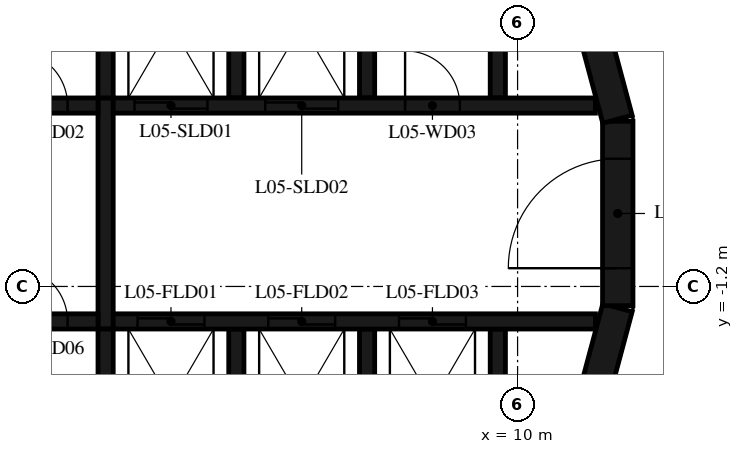
"""IFC4 building model, lengths in metres.
Left out: names, types, materials, properties, quantities, classifications, styles, units other than length and angle.
Written with IfcOpenShell. Run it as: python <this file> out.ifc"""

import sys

from ifc_helpers import new_model, si_unit, direction, frame, frame_2d, origin, place, context, subcontext, project, spatial, polyline, rectangle, outline, extrude, element, fill, save


model = new_model("IFC4")
c1 = context("Model", 3, precision=1e-05, world=origin(), true_north=direction((0.0, 1.0)))
c2 = subcontext(c1, "Body", "Model", "MODEL_VIEW")
j1 = project(units=[si_unit("LENGTHUNIT", "METRE"), si_unit("PLANEANGLEUNIT", "RADIAN")], contexts=[c1])
p1 = place(None, origin())
s1 = spatial("IfcSite", under=j1, at=p1, CompositionType="ELEMENT")
p2 = place(p1, origin())
s2 = spatial("IfcBuilding", under=s1, at=p2, CompositionType="ELEMENT")
p3 = place(p2, frame((0.0, 0.0, 28.2)))
s3 = spatial("IfcBuildingStorey", under=s2, at=p3, CompositionType="ELEMENT", Elevation=28.2)
p4 = place(p3, frame((10.858, -4.479, 0.0), z_axis=(0.0, 0.0, 1.0), x_axis=(0.258734743916, 0.965948410781, 0.0)))
e1 = element("IfcWall", 1, at=p4, inside=s3, PredefinedType="SHEAR", context=c2, shape_type="SweptSolid", body=[
    extrude(rectangle(XDim=3.033, YDim=0.5, at=frame_2d((1.516, 0.0))), origin(), (0.0, 0.0, 1.0), 4.35),
])
p5 = place(p3, frame((11.647, -1.516, 0.0), z_axis=(0.0, 0.0, 1.0), x_axis=(0.0, 1.0, 0.0)))
e2 = element("IfcWall", 2, at=p5, inside=s3, PredefinedType="SHEAR", context=c2, shape_type="SweptSolid", body=[
    extrude(rectangle(XDim=3.033, YDim=0.5, at=frame_2d((1.516, 0.0))), origin(), (0.0, 0.0, 1.0), 4.35),
])
p6 = place(p5, frame((0.616, 0.0, 0.0)))
e3 = element("IfcOpeningElement", 3, at=p6, cuts=e2, PredefinedType="OPENING", context=c2, shape_type="SweptSolid", body=[
    extrude(rectangle(XDim=1.8, YDim=2.1, at=frame_2d((0.9, 1.05))), frame((0.0, 0.26, 0.0), z_axis=(0.0, -1.0, 0.0), x_axis=(1.0, 0.0, 0.0)), (0.0, 0.0, 1.0), 0.52),
])
p7 = place(p3, frame((11.643, 1.55, 0.0), z_axis=(0.0, 0.0, 1.0), x_axis=(-0.258734743916, 0.965948410781, 0.0)))
e4 = element("IfcWall", 4, at=p7, inside=s3, PredefinedType="SHEAR", context=c2, shape_type="SweptSolid", body=[
    extrude(rectangle(XDim=3.033, YDim=0.5, at=frame_2d((1.516, 0.0))), origin(), (0.0, 0.0, 1.0), 4.35),
])
p8 = place(p3, origin())
e5 = element("IfcWall", 5, at=p8, inside=s3, PredefinedType="SHEAR", context=c2, shape_type="SweptSolid", body=[
    extrude(outline(polyline([(-9.55, 4.8), (-7.65, 4.8), (-7.65, 1.9), (-7.4, 1.9), (-7.4, 4.8), (-5.5, 4.8), (-5.5, 1.9), (-5.25, 1.9), (-5.25, 4.8), (-3.35, 4.8), (-3.35, 1.9), (-3.1, 1.9), (-3.1, 4.8), (-1.2, 4.8), (-1.2, 1.9), (-0.95, 1.9), (-0.95, 4.8), (0.95, 4.8), (0.95, 1.9), (1.2, 1.9), (1.2, 4.8), (3.1, 4.8), (3.1, 1.9), (3.35, 1.9), (3.35, 4.8), (5.25, 4.8), (5.25, 1.9), (5.5, 1.9), (5.5, 4.8), (7.4, 4.8), (7.4, 1.9), (7.65, 1.9), (7.65, 4.8), (9.55, 4.8), (9.55, 1.9), (9.8, 1.9), (9.8, 4.8), (9.8, 5.05), (-9.8, 5.05), (-9.8, 4.8), (-9.8, 1.9), (-9.55, 1.9), (-9.55, 4.8)])), origin(), (0.0, 0.0, 1.0), 4.35),
])
p9 = place(p3, origin())
e6 = element("IfcWall", 6, at=p9, inside=s3, PredefinedType="SHEAR", context=c2, shape_type="SweptSolid", body=[
    extrude(outline(polyline([(9.8, -5.05), (9.8, -4.8), (9.8, -1.9), (9.55, -1.9), (9.55, -4.8), (7.65, -4.8), (7.65, -1.9), (7.4, -1.9), (7.4, -4.8), (5.5, -4.8), (5.5, -1.9), (5.25, -1.9), (5.25, -4.8), (3.35, -4.8), (3.35, -1.9), (3.1, -1.9), (3.1, -4.8), (1.2, -4.8), (1.2, -1.9), (0.95, -1.9), (0.95, -4.8), (-0.95, -4.8), (-0.95, -1.9), (-1.2, -1.9), (-1.2, -4.8), (-5.25, -4.8), (-5.25, -1.9), (-5.5, -1.9), (-5.5, -4.8), (-7.4, -4.8), (-7.4, -1.9), (-7.65, -1.9), (-7.65, -4.8), (-9.55, -4.8), (-9.55, -1.9), (-9.8, -1.9), (-9.8, -4.8), (-9.8, -5.05), (9.8, -5.05)])), origin(), (0.0, 0.0, 1.0), 4.35),
])
p10 = place(p3, frame((-11.28, 1.775, 0.0), z_axis=(0.0, 0.0, 1.0), x_axis=(1.0, 0.0, 0.0)))
e7 = element("IfcWall", 7, at=p10, inside=s3, PredefinedType="SHEAR", context=c2, shape_type="SweptSolid", body=[
    extrude(rectangle(XDim=14.38, YDim=0.25, at=frame_2d((7.19, 0.0))), origin(), (0.0, 0.0, 1.0), 4.35),
])
p11 = place(p10, frame((2.13, 0.0, 0.0)))
e8 = element("IfcOpeningElement", 8, at=p11, cuts=e7, PredefinedType="OPENING", context=c2, shape_type="SweptSolid", body=[
    extrude(rectangle(XDim=1.1, YDim=2.1, at=frame_2d((0.55, 1.05))), frame((0.0, 0.135, 0.0), z_axis=(0.0, -1.0, 0.0), x_axis=(1.0, 0.0, 0.0)), (0.0, 0.0, 1.0), 0.27),
])
p12 = place(p10, frame((4.28, 0.0, 0.0)))
e9 = element("IfcOpeningElement", 9, at=p12, cuts=e7, PredefinedType="OPENING", context=c2, shape_type="SweptSolid", body=[
    extrude(rectangle(XDim=1.1, YDim=2.1, at=frame_2d((0.55, 1.05))), frame((0.0, 0.135, 0.0), z_axis=(0.0, -1.0, 0.0), x_axis=(1.0, 0.0, 0.0)), (0.0, 0.0, 1.0), 0.27),
])
p13 = place(p10, frame((6.43, 0.0, 0.0)))
e10 = element("IfcOpeningElement", 10, at=p13, cuts=e7, PredefinedType="OPENING", context=c2, shape_type="SweptSolid", body=[
    extrude(rectangle(XDim=1.1, YDim=2.1, at=frame_2d((0.55, 1.05))), frame((0.0, 0.135, 0.0), z_axis=(0.0, -1.0, 0.0), x_axis=(1.0, 0.0, 0.0)), (0.0, 0.0, 1.0), 0.27),
])
p14 = place(p10, frame((8.58, 0.0, 0.0)))
e11 = element("IfcOpeningElement", 11, at=p14, cuts=e7, PredefinedType="OPENING", context=c2, shape_type="SweptSolid", body=[
    extrude(rectangle(XDim=1.1, YDim=2.1, at=frame_2d((0.55, 1.05))), frame((0.0, 0.135, 0.0), z_axis=(0.0, -1.0, 0.0), x_axis=(1.0, 0.0, 0.0)), (0.0, 0.0, 1.0), 0.27),
])
p15 = place(p10, frame((10.83, 0.0, 0.0)))
e12 = element("IfcOpeningElement", 12, at=p15, cuts=e7, PredefinedType="OPENING", context=c2, shape_type="SweptSolid", body=[
    extrude(rectangle(XDim=0.9, YDim=2.1, at=frame_2d((0.45, 1.05))), frame((0.0, 0.135, 0.0), z_axis=(0.0, -1.0, 0.0), x_axis=(1.0, 0.0, 0.0)), (0.0, 0.0, 1.0), 0.27),
])
p16 = place(p10, frame((12.98, 0.0, 0.0)))
e13 = element("IfcOpeningElement", 13, at=p16, cuts=e7, PredefinedType="OPENING", context=c2, shape_type="SweptSolid", body=[
    extrude(rectangle(XDim=0.9, YDim=2.1, at=frame_2d((0.45, 1.05))), frame((0.0, 0.135, 0.0), z_axis=(0.0, -1.0, 0.0), x_axis=(1.0, 0.0, 0.0)), (0.0, 0.0, 1.0), 0.27),
])
p17 = place(p3, frame((3.35, 1.775, 0.0), z_axis=(0.0, 0.0, 1.0), x_axis=(1.0, 0.0, 0.0)))
e14 = element("IfcWall", 14, at=p17, inside=s3, PredefinedType="SHEAR", context=c2, shape_type="SweptSolid", body=[
    extrude(rectangle(XDim=7.93, YDim=0.25, at=frame_2d((3.965, 0.0))), origin(), (0.0, 0.0, 1.0), 4.35),
])
p18 = place(p17, frame((0.35, 0.0, 0.0)))
e15 = element("IfcOpeningElement", 15, at=p18, cuts=e14, PredefinedType="OPENING", context=c2, shape_type="SweptSolid", body=[
    extrude(rectangle(XDim=1.2, YDim=2.4, at=frame_2d((0.6, 1.2))), frame((0.0, 0.135, 0.0), z_axis=(0.0, -1.0, 0.0), x_axis=(1.0, 0.0, 0.0)), (0.0, 0.0, 1.0), 0.27),
])
p19 = place(p17, frame((2.5, 0.0, 0.0)))
e16 = element("IfcOpeningElement", 16, at=p19, cuts=e14, PredefinedType="OPENING", context=c2, shape_type="SweptSolid", body=[
    extrude(rectangle(XDim=1.2, YDim=2.4, at=frame_2d((0.6, 1.2))), frame((0.0, 0.135, 0.0), z_axis=(0.0, -1.0, 0.0), x_axis=(1.0, 0.0, 0.0)), (0.0, 0.0, 1.0), 0.27),
])
p20 = place(p17, frame((4.8, 0.0, 0.0)))
e17 = element("IfcOpeningElement", 17, at=p20, cuts=e14, PredefinedType="OPENING", context=c2, shape_type="SweptSolid", body=[
    extrude(rectangle(XDim=0.9, YDim=2.1, at=frame_2d((0.45, 1.05))), frame((0.0, 0.135, 0.0), z_axis=(0.0, -1.0, 0.0), x_axis=(1.0, 0.0, 0.0)), (0.0, 0.0, 1.0), 0.27),
])
p21 = place(p3, frame((-11.28, -1.775, 0.0), z_axis=(0.0, 0.0, 1.0), x_axis=(1.0, 0.0, 0.0)))
e18 = element("IfcWall", 18, at=p21, inside=s3, PredefinedType="SHEAR", context=c2, shape_type="SweptSolid", body=[
    extrude(rectangle(XDim=14.38, YDim=0.25, at=frame_2d((7.19, 0.0))), origin(), (0.0, 0.0, 1.0), 4.35),
])
p22 = place(p21, frame((7.605, 0.0, 0.0)))
e19 = element("IfcOpeningElement", 19, at=p22, cuts=e18, PredefinedType="OPENING", context=c2, shape_type="SweptSolid", body=[
    extrude(rectangle(XDim=0.9, YDim=2.1, at=frame_2d((0.45, 1.05))), frame((0.0, 0.135, 0.0), z_axis=(0.0, -1.0, 0.0), x_axis=(1.0, 0.0, 0.0)), (0.0, 0.0, 1.0), 0.27),
])
p23 = place(p21, frame((10.83, 0.0, 0.0)))
e20 = element("IfcOpeningElement", 20, at=p23, cuts=e18, PredefinedType="OPENING", context=c2, shape_type="SweptSolid", body=[
    extrude(rectangle(XDim=0.9, YDim=2.1, at=frame_2d((0.45, 1.05))), frame((0.0, 0.135, 0.0), z_axis=(0.0, -1.0, 0.0), x_axis=(1.0, 0.0, 0.0)), (0.0, 0.0, 1.0), 0.27),
])
p24 = place(p21, frame((12.98, 0.0, 0.0)))
e21 = element("IfcOpeningElement", 21, at=p24, cuts=e18, PredefinedType="OPENING", context=c2, shape_type="SweptSolid", body=[
    extrude(rectangle(XDim=0.9, YDim=2.1, at=frame_2d((0.45, 1.05))), frame((0.0, 0.135, 0.0), z_axis=(0.0, -1.0, 0.0), x_axis=(1.0, 0.0, 0.0)), (0.0, 0.0, 1.0), 0.27),
])
p25 = place(p3, frame((3.35, -1.775, 0.0), z_axis=(0.0, 0.0, 1.0), x_axis=(1.0, 0.0, 0.0)))
e22 = element("IfcWall", 22, at=p25, inside=s3, PredefinedType="SHEAR", context=c2, shape_type="SweptSolid", body=[
    extrude(rectangle(XDim=7.93, YDim=0.25, at=frame_2d((3.965, 0.0))), origin(), (0.0, 0.0, 1.0), 4.35),
])
p26 = place(p25, frame((0.4, 0.0, 0.0)))
e23 = element("IfcOpeningElement", 23, at=p26, cuts=e22, PredefinedType="OPENING", context=c2, shape_type="SweptSolid", body=[
    extrude(rectangle(XDim=1.1, YDim=2.4, at=frame_2d((0.55, 1.2))), frame((0.0, 0.135, 0.0), z_axis=(0.0, -1.0, 0.0), x_axis=(1.0, 0.0, 0.0)), (0.0, 0.0, 1.0), 0.27),
])
p27 = place(p25, frame((2.55, 0.0, 0.0)))
e24 = element("IfcOpeningElement", 24, at=p27, cuts=e22, PredefinedType="OPENING", context=c2, shape_type="SweptSolid", body=[
    extrude(rectangle(XDim=1.1, YDim=2.4, at=frame_2d((0.55, 1.2))), frame((0.0, 0.135, 0.0), z_axis=(0.0, -1.0, 0.0), x_axis=(1.0, 0.0, 0.0)), (0.0, 0.0, 1.0), 0.27),
])
p28 = place(p25, frame((4.7, 0.0, 0.0)))
e25 = element("IfcOpeningElement", 25, at=p28, cuts=e22, PredefinedType="OPENING", context=c2, shape_type="SweptSolid", body=[
    extrude(rectangle(XDim=1.1, YDim=2.4, at=frame_2d((0.55, 1.2))), frame((0.0, 0.135, 0.0), z_axis=(0.0, -1.0, 0.0), x_axis=(1.0, 0.0, 0.0)), (0.0, 0.0, 1.0), 0.27),
])
p29 = place(p3, frame((3.225, -1.9, 0.0), z_axis=(0.0, 0.0, 1.0), x_axis=(0.0, 1.0, 0.0)))
e26 = element("IfcWall", 26, at=p29, inside=s3, PredefinedType="SHEAR", context=c2, shape_type="SweptSolid", body=[
    extrude(rectangle(XDim=3.8, YDim=0.25, at=frame_2d((1.9, 0.0))), origin(), (0.0, 0.0, 1.0), 4.35),
])
p30 = place(p6, origin())
e27 = element("IfcDoor", 27, at=p30, inside=s3, OperationType="DOUBLE_DOOR_SINGLE_SWING", PredefinedType="DOOR", context=c2, shape_type="SweptSolid", body=[
    extrude(rectangle(XDim=1.8, YDim=2.1, at=frame_2d((0.9, 1.05))), frame((0.0, 0.025, 0.0), z_axis=(0.0, -1.0, 0.0), x_axis=(1.0, 0.0, 0.0)), (0.0, 0.0, 1.0), 0.05),
])
fill(e3, e27)
p31 = place(p18, origin())
e28 = element("IfcDoor", 28, at=p31, inside=s3, OperationType="DOUBLE_DOOR_SLIDING", PredefinedType="DOOR", context=c2, shape_type="SweptSolid", body=[
    extrude(rectangle(XDim=1.2, YDim=2.4, at=frame_2d((0.6, 1.2))), frame((0.0, 0.025, 0.0), z_axis=(0.0, -1.0, 0.0), x_axis=(1.0, 0.0, 0.0)), (0.0, 0.0, 1.0), 0.05),
])
fill(e15, e28)
p32 = place(p19, origin())
e29 = element("IfcDoor", 29, at=p32, inside=s3, OperationType="DOUBLE_DOOR_SLIDING", PredefinedType="DOOR", context=c2, shape_type="SweptSolid", body=[
    extrude(rectangle(XDim=1.2, YDim=2.4, at=frame_2d((0.6, 1.2))), frame((0.0, 0.025, 0.0), z_axis=(0.0, -1.0, 0.0), x_axis=(1.0, 0.0, 0.0)), (0.0, 0.0, 1.0), 0.05),
])
fill(e16, e29)
p33 = place(p26, origin())
e30 = element("IfcDoor", 30, at=p33, inside=s3, OperationType="DOUBLE_DOOR_SLIDING", PredefinedType="DOOR", context=c2, shape_type="SweptSolid", body=[
    extrude(rectangle(XDim=1.1, YDim=2.4, at=frame_2d((0.55, 1.2))), frame((0.0, 0.025, 0.0), z_axis=(0.0, -1.0, 0.0), x_axis=(1.0, 0.0, 0.0)), (0.0, 0.0, 1.0), 0.05),
])
fill(e23, e30)
p34 = place(p27, origin())
e31 = element("IfcDoor", 31, at=p34, inside=s3, OperationType="DOUBLE_DOOR_SLIDING", PredefinedType="DOOR", context=c2, shape_type="SweptSolid", body=[
    extrude(rectangle(XDim=1.1, YDim=2.4, at=frame_2d((0.55, 1.2))), frame((0.0, 0.025, 0.0), z_axis=(0.0, -1.0, 0.0), x_axis=(1.0, 0.0, 0.0)), (0.0, 0.0, 1.0), 0.05),
])
fill(e24, e31)
p35 = place(p28, origin())
e32 = element("IfcDoor", 32, at=p35, inside=s3, OperationType="DOUBLE_DOOR_SLIDING", PredefinedType="DOOR", context=c2, shape_type="SweptSolid", body=[
    extrude(rectangle(XDim=1.1, YDim=2.4, at=frame_2d((0.55, 1.2))), frame((0.0, 0.025, 0.0), z_axis=(0.0, -1.0, 0.0), x_axis=(1.0, 0.0, 0.0)), (0.0, 0.0, 1.0), 0.05),
])
fill(e25, e32)
p36 = place(p16, origin())
e33 = element("IfcDoor", 33, at=p36, inside=s3, OperationType="SINGLE_SWING_LEFT", PredefinedType="DOOR", context=c2, shape_type="SweptSolid", body=[
    extrude(rectangle(XDim=0.9, YDim=2.1, at=frame_2d((0.45, 1.05))), frame((0.0, 0.025, 0.0), z_axis=(0.0, -1.0, 0.0), x_axis=(1.0, 0.0, 0.0)), (0.0, 0.0, 1.0), 0.05),
])
fill(e13, e33)
p37 = place(p20, origin())
e34 = element("IfcDoor", 34, at=p37, inside=s3, OperationType="SINGLE_SWING_RIGHT", PredefinedType="DOOR", context=c2, shape_type="SweptSolid", body=[
    extrude(rectangle(XDim=0.9, YDim=2.1, at=frame_2d((0.45, 1.05))), frame((0.0, 0.025, 0.0), z_axis=(0.0, -1.0, 0.0), x_axis=(1.0, 0.0, 0.0)), (0.0, 0.0, 1.0), 0.05),
])
fill(e17, e34)
p38 = place(p24, origin())
e35 = element("IfcDoor", 35, at=p38, inside=s3, OperationType="SINGLE_SWING_LEFT", PredefinedType="DOOR", context=c2, shape_type="SweptSolid", body=[
    extrude(rectangle(XDim=0.9, YDim=2.1, at=frame_2d((0.45, 1.05))), frame((0.0, 0.025, 0.0), z_axis=(0.0, -1.0, 0.0), x_axis=(1.0, 0.0, 0.0)), (0.0, 0.0, 1.0), 0.05),
])
fill(e21, e35)
save(model, sys.argv[1])
